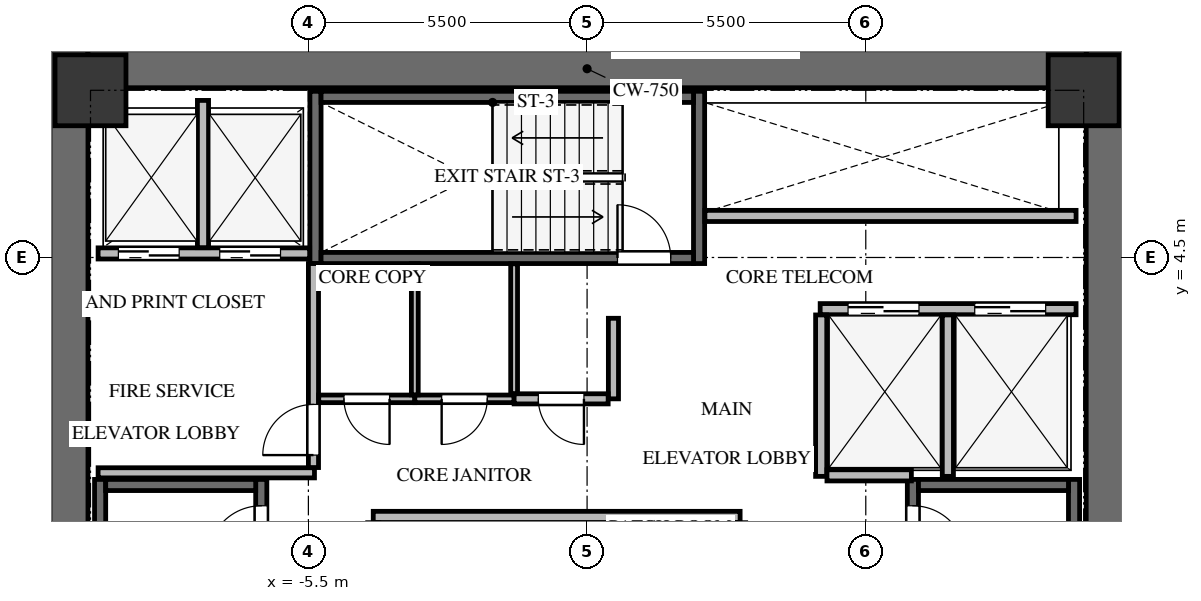
"""IFC4 building model, lengths in metres.
Left out: names, types, materials, properties, quantities, classifications, styles, units other than length and angle.
Written with IfcOpenShell. Run it as: python <this file> out.ifc"""

import sys

from ifc_helpers import new_model, si_unit, direction, frame, frame_2d, origin, origin_2d, place, context, subcontext, project, spatial, rectangle, extrude, source, transform, mapped, element, fill, save


model = new_model("IFC4")
c1 = context("Model", 3, precision=1e-05, world=origin(), true_north=direction((0.0, 1.0)))
c2 = subcontext(c1, "Body", "Model", "MODEL_VIEW")
j1 = project(units=[si_unit("LENGTHUNIT", "METRE"), si_unit("PLANEANGLEUNIT", "RADIAN")], contexts=[c1])
p1 = place(None, origin())
s1 = spatial("IfcSite", under=j1, at=p1, CompositionType="ELEMENT")
p2 = place(p1, origin())
s2 = spatial("IfcBuilding", under=s1, at=p2, CompositionType="ELEMENT")
p3 = place(p2, frame((0.0, 0.0, 120.6)))
s3 = spatial("IfcBuildingStorey", under=s2, at=p3, CompositionType="ELEMENT", Elevation=120.6)
for number, where, z_axis, x_axis in (
    (1, (-10.225, -8.6, 0.0), (0.0, 0.0, 1.0), (0.0, 1.0, 0.0)),
    (2, (10.225, -8.6, 0.0), (0.0, 0.0, 1.0), (0.0, 1.0, 0.0)),
):
    element("IfcWall", number, at=place(p3, frame(where, z_axis=z_axis, x_axis=x_axis)), inside=s3, PredefinedType="SHEAR", context=c2, shape_type="SweptSolid", body=[
        extrude(rectangle(XDim=17.2, YDim=0.75, at=frame_2d((8.6, 0.0))), origin(), (0.0, 0.0, 1.0), 3.3),
    ])
p4 = place(p3, frame((-9.85, 8.225, 0.0), z_axis=(0.0, 0.0, 1.0), x_axis=(1.0, 0.0, 0.0)))
e3 = element("IfcWall", 3, at=p4, inside=s3, PredefinedType="SHEAR", context=c2, shape_type="SweptSolid", body=[
    extrude(rectangle(XDim=19.7, YDim=0.75, at=frame_2d((9.85, 0.0))), origin(), (0.0, 0.0, 1.0), 3.3),
])
p5 = place(p3, frame((-6.43, -7.77, -0.24), z_axis=(0.0, 0.0, 1.0), x_axis=(0.0, 1.0, 0.0)))
e4 = element("IfcWall", 4, at=p5, inside=s3, PredefinedType="SHEAR", context=c2, shape_type="SweptSolid", body=[
    extrude(rectangle(XDim=7.89, YDim=0.22, at=frame_2d((3.945, 0.0))), origin(), (0.0, 0.0, 1.0), 3.3),
])
p6 = place(p5, frame((6.32, 0.0, 0.0)))
e5 = element("IfcOpeningElement", 5, at=p6, cuts=e4, PredefinedType="OPENING", context=c2, shape_type="SweptSolid", body=[
    extrude(rectangle(XDim=1.05, YDim=2.15, at=frame_2d((0.525, 1.075))), frame((0.0, 0.12, 0.0), z_axis=(0.0, -1.0, 0.0), x_axis=(1.0, 0.0, 0.0)), (0.0, 0.0, 1.0), 0.24),
])
p7 = place(p3, frame((-9.61, 0.12, -0.24), z_axis=(0.0, 0.0, 1.0), x_axis=(0.0, -1.0, 0.0)))
e6 = element("IfcWall", 6, at=p7, inside=s3, PredefinedType="SHEAR", context=c2, shape_type="SweptSolid", body=[
    extrude(rectangle(XDim=7.89, YDim=0.22, at=frame_2d((3.945, 0.0))), origin(), (0.0, 0.0, 1.0), 3.3),
])
p8 = place(p3, frame((-6.54, 0.01, -0.24), z_axis=(0.0, 0.0, 1.0), x_axis=(-1.0, 0.0, 0.0)))
e7 = element("IfcWall", 7, at=p8, inside=s3, PredefinedType="SHEAR", context=c2, shape_type="SweptSolid", body=[
    extrude(rectangle(XDim=2.96, YDim=0.22, at=frame_2d((1.48, 0.0))), origin(), (0.0, 0.0, 1.0), 3.3),
])
p9 = place(p3, frame((9.61, -7.77, -0.24), z_axis=(0.0, 0.0, 1.0), x_axis=(0.0, 1.0, 0.0)))
e8 = element("IfcWall", 8, at=p9, inside=s3, PredefinedType="SHEAR", context=c2, shape_type="SweptSolid", body=[
    extrude(rectangle(XDim=7.89, YDim=0.22, at=frame_2d((3.945, 0.0))), origin(), (0.0, 0.0, 1.0), 3.3),
])
p10 = place(p3, frame((6.43, 0.12, -0.24), z_axis=(0.0, 0.0, 1.0), x_axis=(0.0, -1.0, 0.0)))
e9 = element("IfcWall", 9, at=p10, inside=s3, PredefinedType="SHEAR", context=c2, shape_type="SweptSolid", body=[
    extrude(rectangle(XDim=7.89, YDim=0.22, at=frame_2d((3.945, 0.0))), origin(), (0.0, 0.0, 1.0), 3.3),
])
p11 = place(p10, frame((0.52, 0.0, 0.0)))
e10 = element("IfcOpeningElement", 10, at=p11, cuts=e9, PredefinedType="OPENING", context=c2, shape_type="SweptSolid", body=[
    extrude(rectangle(XDim=1.05, YDim=2.15, at=frame_2d((0.525, 1.075))), frame((0.0, 0.12, 0.0), z_axis=(0.0, -1.0, 0.0), x_axis=(1.0, 0.0, 0.0)), (0.0, 0.0, 1.0), 0.24),
])
p12 = place(p3, frame((9.5, 0.01, -0.24), z_axis=(0.0, 0.0, 1.0), x_axis=(-1.0, 0.0, 0.0)))
e11 = element("IfcWall", 11, at=p12, inside=s3, PredefinedType="SHEAR", context=c2, shape_type="SweptSolid", body=[
    extrude(rectangle(XDim=2.96, YDim=0.22, at=frame_2d((1.48, 0.0))), origin(), (0.0, 0.0, 1.0), 3.3),
])
for number, where, z_axis, x_axis in (
    (12, (2.21, 4.38, -0.24), (0.0, 0.0, 1.0), (0.0, 1.0, 0.0)),
    (13, (-5.36, 7.78, -0.24), (0.0, 0.0, 1.0), (0.0, -1.0, 0.0)),
):
    element("IfcWall", number, at=place(p3, frame(where, z_axis=z_axis, x_axis=x_axis)), inside=s3, PredefinedType="SHEAR", context=c2, shape_type="SweptSolid", body=[
        extrude(rectangle(XDim=3.4, YDim=0.22, at=frame_2d((1.7, 0.0))), origin(), (0.0, 0.0, 1.0), 3.3),
    ])
p13 = place(p3, frame((-5.25, 4.49, -0.24), z_axis=(0.0, 0.0, 1.0), x_axis=(1.0, 0.0, 0.0)))
e14 = element("IfcWall", 14, at=p13, inside=s3, PredefinedType="SHEAR", context=c2, shape_type="SweptSolid", body=[
    extrude(rectangle(XDim=7.35, YDim=0.22, at=frame_2d((3.675, 0.0))), origin(), (0.0, 0.0, 1.0), 3.3),
])
p14 = place(p13, frame((5.85, 0.0, 0.0)))
e15 = element("IfcOpeningElement", 15, at=p14, cuts=e14, PredefinedType="OPENING", context=c2, shape_type="SweptSolid", body=[
    extrude(rectangle(XDim=1.05, YDim=2.15, at=frame_2d((0.525, 1.075))), frame((0.0, 0.12, 0.0), z_axis=(0.0, -1.0, 0.0), x_axis=(1.0, 0.0, 0.0)), (0.0, 0.0, 1.0), 0.24),
])
p15 = place(p3, frame((2.1, 7.67, -0.24), z_axis=(0.0, 0.0, 1.0), x_axis=(-1.0, 0.0, 0.0)))
e16 = element("IfcWall", 16, at=p15, inside=s3, PredefinedType="SHEAR", context=c2, shape_type="SweptSolid", body=[
    extrude(rectangle(XDim=7.35, YDim=0.22, at=frame_2d((3.675, 0.0))), origin(), (0.0, 0.0, 1.0), 3.3),
])
m1 = source(origin(), c2, "Body", "SweptSolid", [
    extrude(rectangle(XDim=1.4, YDim=1.4, at=origin_2d()), origin(), (0.0, 0.0, 1.0), 3.3),
])
for number, where, z_axis, x_axis in (
    (17, (9.8, 7.8, -0.24), (0.0, 0.0, 1.0), (1.0, 0.0, 0.0)),
    (18, (-9.8, 7.8, -0.24), (0.0, 0.0, 1.0), (1.0, 0.0, 0.0)),
):
    element("IfcColumn", number, at=place(p3, frame(where, z_axis=z_axis, x_axis=x_axis)), inside=s3, PredefinedType="COLUMN", context=c2, shape_type="MappedRepresentation", body=[
        mapped(m1, transform((0.0, 0.0, 0.0), x_axis=(1.0, 0.0, 0.0), y_axis=(0.0, 1.0, 0.0), z_axis=(0.0, 0.0, 1.0), scale=1.0)),
    ])
p16 = place(p3, frame((-9.65, 4.58, 0.0), z_axis=(0.0, 0.0, 1.0), x_axis=(1.0, 0.0, 0.0)))
e19 = element("IfcWall", 19, at=p16, inside=s3, PredefinedType="SOLIDWALL", context=c2, shape_type="SweptSolid", body=[
    extrude(rectangle(XDim=4.175, YDim=0.22, at=frame_2d((2.087, 0.0))), origin(), (0.0, 0.0, 1.0), 3.045),
])
p17 = place(p16, frame((0.4, 0.0, 0.0)))
e20 = element("IfcOpeningElement", 20, at=p17, cuts=e19, PredefinedType="OPENING", context=c2, shape_type="SweptSolid", body=[
    extrude(rectangle(XDim=1.2, YDim=2.15, at=frame_2d((0.6, 1.075))), frame((0.0, 0.12, 0.0), z_axis=(0.0, -1.0, 0.0), x_axis=(1.0, 0.0, 0.0)), (0.0, 0.0, 1.0), 0.24),
])
p18 = place(p16, frame((2.4, 0.0, 0.0)))
e21 = element("IfcOpeningElement", 21, at=p18, cuts=e19, PredefinedType="OPENING", context=c2, shape_type="SweptSolid", body=[
    extrude(rectangle(XDim=1.2, YDim=2.15, at=frame_2d((0.6, 1.075))), frame((0.0, 0.12, 0.0), z_axis=(0.0, -1.0, 0.0), x_axis=(1.0, 0.0, 0.0)), (0.0, 0.0, 1.0), 0.24),
])
p19 = place(p3, frame((-7.58, 4.694, 0.0), z_axis=(0.0, 0.0, 1.0), x_axis=(0.0, 1.0, 0.0)))
e22 = element("IfcWall", 22, at=p19, inside=s3, PredefinedType="SOLIDWALL", context=c2, shape_type="SweptSolid", body=[
    extrude(rectangle(XDim=2.906, YDim=0.22, at=frame_2d((1.453, 0.0))), origin(), (0.0, 0.0, 1.0), 3.045),
])
p20 = place(p3, frame((-9.65, 0.25, 0.0), z_axis=(0.0, 0.0, 1.0), x_axis=(1.0, 0.0, 0.0)))
e23 = element("IfcWall", 23, at=p20, inside=s3, PredefinedType="SOLIDWALL", context=c2, shape_type="SweptSolid", body=[
    extrude(rectangle(XDim=4.27, YDim=0.2, at=frame_2d((2.135, 0.0))), origin(), (0.0, 0.0, 1.0), 3.045),
])
p21 = place(p3, frame((-5.4, 0.354, 0.0), z_axis=(0.0, 0.0, 1.0), x_axis=(0.0, 1.0, 0.0)))
e24 = element("IfcWall", 24, at=p21, inside=s3, PredefinedType="SOLIDWALL", context=c2, shape_type="SweptSolid", body=[
    extrude(rectangle(XDim=4.026, YDim=0.2, at=frame_2d((2.013, 0.0))), origin(), (0.0, 0.0, 1.0), 3.045),
])
p22 = place(p21, frame((0.246, 0.0, 0.0)))
e25 = element("IfcOpeningElement", 25, at=p22, cuts=e24, PredefinedType="OPENING", context=c2, shape_type="SweptSolid", body=[
    extrude(rectangle(XDim=1.0, YDim=2.15, at=frame_2d((0.5, 1.075))), frame((0.0, 0.11, 0.0), z_axis=(0.0, -1.0, 0.0), x_axis=(1.0, 0.0, 0.0)), (0.0, 0.0, 1.0), 0.22),
])
p23 = place(p3, frame((4.6, 3.48, 0.0), z_axis=(0.0, 0.0, 1.0), x_axis=(1.0, 0.0, 0.0)))
e26 = element("IfcWall", 26, at=p23, inside=s3, PredefinedType="SOLIDWALL", context=c2, shape_type="SweptSolid", body=[
    extrude(rectangle(XDim=5.05, YDim=0.22, at=frame_2d((2.525, 0.0))), origin(), (0.0, 0.0, 1.0), 3.045),
])
p24 = place(p23, frame((0.55, 0.0, 0.0)))
e27 = element("IfcOpeningElement", 27, at=p24, cuts=e26, PredefinedType="OPENING", context=c2, shape_type="SweptSolid", body=[
    extrude(rectangle(XDim=1.4, YDim=2.15, at=frame_2d((0.7, 1.075))), frame((0.0, 0.12, 0.0), z_axis=(0.0, -1.0, 0.0), x_axis=(1.0, 0.0, 0.0)), (0.0, 0.0, 1.0), 0.24),
])
p25 = place(p23, frame((3.05, 0.0, 0.0)))
e28 = element("IfcOpeningElement", 28, at=p25, cuts=e26, PredefinedType="OPENING", context=c2, shape_type="SweptSolid", body=[
    extrude(rectangle(XDim=1.4, YDim=2.15, at=frame_2d((0.7, 1.075))), frame((0.0, 0.12, 0.0), z_axis=(0.0, -1.0, 0.0), x_axis=(1.0, 0.0, 0.0)), (0.0, 0.0, 1.0), 0.24),
])
for number, where, z_axis, x_axis in (
    (29, (4.62, 0.18, 0.0), (0.0, 0.0, 1.0), (0.0, 1.0, 0.0)),
    (30, (7.12, 0.18, 0.0), (0.0, 0.0, 1.0), (0.0, 1.0, 0.0)),
):
    element("IfcWall", number, at=place(p3, frame(where, z_axis=z_axis, x_axis=x_axis)), inside=s3, PredefinedType="SOLIDWALL", context=c2, shape_type="SweptSolid", body=[
        extrude(rectangle(XDim=3.186, YDim=0.22, at=frame_2d((1.593, 0.0))), origin(), (0.0, 0.0, 1.0), 3.045),
    ])
p26 = place(p3, frame((4.734, 0.2, 0.0), z_axis=(0.0, 0.0, 1.0), x_axis=(1.0, 0.0, 0.0)))
e31 = element("IfcWall", 31, at=p26, inside=s3, PredefinedType="SOLIDWALL", context=c2, shape_type="SweptSolid", body=[
    extrude(rectangle(XDim=1.666, YDim=0.22, at=frame_2d((0.833, 0.0))), origin(), (0.0, 0.0, 1.0), 3.045),
])
p27 = place(p3, frame((-4.22, -0.62, 0.0), z_axis=(0.0, 0.0, 1.0), x_axis=(1.0, 0.0, 0.0)))
e32 = element("IfcWall", 32, at=p27, inside=s3, PredefinedType="SOLIDWALL", context=c2, shape_type="SweptSolid", body=[
    extrude(rectangle(XDim=7.24, YDim=0.22, at=frame_2d((3.62, 0.0))), origin(), (0.0, 0.0, 1.0), 3.045),
])
p28 = place(p3, frame((2.325, 5.32, 0.0), z_axis=(0.0, 0.0, 1.0), x_axis=(1.0, 0.0, 0.0)))
e33 = element("IfcWall", 33, at=p28, inside=s3, PredefinedType="SOLIDWALL", context=c2, shape_type="SweptSolid", body=[
    extrude(rectangle(XDim=7.325, YDim=0.22, at=frame_2d((3.663, 0.0))), origin(), (0.0, 0.0, 1.0), 3.045),
])
p29 = place(p3, frame((-3.4, 1.71, 0.0), z_axis=(0.0, 0.0, 1.0), x_axis=(-1.0, 0.0, 0.0)))
e34 = element("IfcWall", 34, at=p29, inside=s3, PredefinedType="PARTITIONING", context=c2, shape_type="SweptSolid", body=[
    extrude(rectangle(XDim=1.896, YDim=0.15, at=frame_2d((0.948, 0.0))), origin(), (0.0, 0.0, 1.0), 3.045),
])
p30 = place(p29, frame((0.498, 0.0, 0.0)))
e35 = element("IfcOpeningElement", 35, at=p30, cuts=e34, PredefinedType="OPENING", context=c2, shape_type="SweptSolid", body=[
    extrude(rectangle(XDim=0.9, YDim=2.05, at=frame_2d((0.45, 1.025))), frame((0.0, 0.085, 0.0), z_axis=(0.0, -1.0, 0.0), x_axis=(1.0, 0.0, 0.0)), (0.0, 0.0, 1.0), 0.17),
])
p31 = place(p3, frame((-1.44, 1.71, 0.0), z_axis=(0.0, 0.0, 1.0), x_axis=(-1.0, 0.0, 0.0)))
e36 = element("IfcWall", 36, at=p31, inside=s3, PredefinedType="PARTITIONING", context=c2, shape_type="SweptSolid", body=[
    extrude(rectangle(XDim=1.96, YDim=0.15, at=frame_2d((0.98, 0.0))), origin(), (0.0, 0.0, 1.0), 3.045),
])
p32 = place(p31, frame((0.53, 0.0, 0.0)))
e37 = element("IfcOpeningElement", 37, at=p32, cuts=e36, PredefinedType="OPENING", context=c2, shape_type="SweptSolid", body=[
    extrude(rectangle(XDim=0.9, YDim=2.05, at=frame_2d((0.45, 1.025))), frame((0.0, 0.085, 0.0), z_axis=(0.0, -1.0, 0.0), x_axis=(1.0, 0.0, 0.0)), (0.0, 0.0, 1.0), 0.17),
])
p33 = place(p3, frame((0.52, 3.3, 0.0), z_axis=(0.0, 0.0, 1.0), x_axis=(0.0, -1.0, 0.0)))
e38 = element("IfcWall", 38, at=p33, inside=s3, PredefinedType="SOLIDWALL", context=c2, shape_type="SweptSolid", body=[
    extrude(rectangle(XDim=1.59, YDim=0.2, at=frame_2d((0.795, 0.0))), origin(), (0.0, 0.0, 1.0), 3.045),
])
p34 = place(p3, frame((0.416, 1.71, 0.0), z_axis=(0.0, 0.0, 1.0), x_axis=(-1.0, 0.0, 0.0)))
e39 = element("IfcWall", 39, at=p34, inside=s3, PredefinedType="SOLIDWALL", context=c2, shape_type="SweptSolid", body=[
    extrude(rectangle(XDim=1.856, YDim=0.2, at=frame_2d((0.928, 0.0))), origin(), (0.0, 0.0, 1.0), 3.045),
])
p35 = place(p34, frame((0.478, 0.0, 0.0)))
e40 = element("IfcOpeningElement", 40, at=p35, cuts=e39, PredefinedType="OPENING", context=c2, shape_type="SweptSolid", body=[
    extrude(rectangle(XDim=0.9, YDim=2.05, at=frame_2d((0.45, 1.025))), frame((0.0, 0.11, 0.0), z_axis=(0.0, -1.0, 0.0), x_axis=(1.0, 0.0, 0.0)), (0.0, 0.0, 1.0), 0.22),
])
p36 = place(p3, frame((-3.4, 4.375, 0.0), z_axis=(0.0, 0.0, 1.0), x_axis=(0.0, -1.0, 0.0)))
e41 = element("IfcWall", 41, at=p36, inside=s3, PredefinedType="PARTITIONING", context=c2, shape_type="SweptSolid", body=[
    extrude(rectangle(XDim=2.586, YDim=0.135, at=frame_2d((1.293, 0.0))), origin(), (0.0, 0.0, 1.0), 3.045),
])
p37 = place(p3, frame((-1.44, 4.375, 0.0), z_axis=(0.0, 0.0, 1.0), x_axis=(0.0, -1.0, 0.0)))
e42 = element("IfcWall", 42, at=p37, inside=s3, PredefinedType="PARTITIONING", context=c2, shape_type="SweptSolid", body=[
    extrude(rectangle(XDim=2.561, YDim=0.135, at=frame_2d((1.281, 0.0))), origin(), (0.0, 0.0, 1.0), 3.045),
])
m2 = source(origin(), c2, "Body", "SweptSolid", [
    extrude(rectangle(XDim=1.05, YDim=2.15, at=frame_2d((0.525, 1.075))), frame((0.0, 0.025, 0.0), z_axis=(0.0, -1.0, 0.0), x_axis=(1.0, 0.0, 0.0)), (0.0, 0.0, 1.0), 0.05),
])
p38 = place(p6, origin())
e43 = element("IfcDoor", 43, at=p38, inside=s3, OperationType="SINGLE_SWING_LEFT", PredefinedType="DOOR", context=c2, shape_type="MappedRepresentation", body=[
    mapped(m2, transform((0.0, 0.0, 0.0), x_axis=(1.0, 0.0, 0.0), y_axis=(0.0, 1.0, 0.0), z_axis=(0.0, 0.0, 1.0), scale=1.0)),
])
fill(e5, e43)
m3 = source(origin(), c2, "Body", "SweptSolid", [
    extrude(rectangle(XDim=1.05, YDim=2.15, at=frame_2d((0.525, 1.075))), frame((0.0, 0.025, 0.0), z_axis=(0.0, -1.0, 0.0), x_axis=(1.0, 0.0, 0.0)), (0.0, 0.0, 1.0), 0.05),
])
p39 = place(p11, origin())
e44 = element("IfcDoor", 44, at=p39, inside=s3, OperationType="SINGLE_SWING_RIGHT", PredefinedType="DOOR", context=c2, shape_type="MappedRepresentation", body=[
    mapped(m3, transform((0.0, 0.0, 0.0), x_axis=(1.0, 0.0, 0.0), y_axis=(0.0, 1.0, 0.0), z_axis=(0.0, 0.0, 1.0), scale=1.0)),
])
fill(e10, e44)
p40 = place(p14, origin())
e45 = element("IfcDoor", 45, at=p40, inside=s3, OperationType="SINGLE_SWING_LEFT", PredefinedType="DOOR", context=c2, shape_type="MappedRepresentation", body=[
    mapped(m2, transform((0.0, 0.0, 0.0), x_axis=(1.0, 0.0, 0.0), y_axis=(0.0, 1.0, 0.0), z_axis=(0.0, 0.0, 1.0), scale=1.0)),
])
fill(e15, e45)
m4 = source(origin(), c2, "Body", "SweptSolid", [
    extrude(rectangle(XDim=1.2, YDim=2.15, at=frame_2d((0.6, 1.075))), frame((0.0, 0.025, 0.0), z_axis=(0.0, -1.0, 0.0), x_axis=(1.0, 0.0, 0.0)), (0.0, 0.0, 1.0), 0.05),
])
p41 = place(p17, origin())
e46 = element("IfcDoor", 46, at=p41, inside=s3, OperationType="DOUBLE_DOOR_SLIDING", PredefinedType="DOOR", context=c2, shape_type="MappedRepresentation", body=[
    mapped(m4, transform((0.0, 0.0, 0.0), x_axis=(1.0, 0.0, 0.0), y_axis=(0.0, 1.0, 0.0), z_axis=(0.0, 0.0, 1.0), scale=1.0)),
])
fill(e20, e46)
p42 = place(p18, origin())
e47 = element("IfcDoor", 47, at=p42, inside=s3, OperationType="DOUBLE_DOOR_SLIDING", PredefinedType="DOOR", context=c2, shape_type="MappedRepresentation", body=[
    mapped(m4, transform((0.0, 0.0, 0.0), x_axis=(1.0, 0.0, 0.0), y_axis=(0.0, 1.0, 0.0), z_axis=(0.0, 0.0, 1.0), scale=1.0)),
])
fill(e21, e47)
m5 = source(origin(), c2, "Body", "SweptSolid", [
    extrude(rectangle(XDim=1.0, YDim=2.15, at=frame_2d((0.5, 1.075))), frame((0.0, 0.025, 0.0), z_axis=(0.0, -1.0, 0.0), x_axis=(1.0, 0.0, 0.0)), (0.0, 0.0, 1.0), 0.05),
])
p43 = place(p22, origin())
e48 = element("IfcDoor", 48, at=p43, inside=s3, OperationType="SINGLE_SWING_LEFT", PredefinedType="DOOR", context=c2, shape_type="MappedRepresentation", body=[
    mapped(m5, transform((0.0, 0.0, 0.0), x_axis=(1.0, 0.0, 0.0), y_axis=(0.0, 1.0, 0.0), z_axis=(0.0, 0.0, 1.0), scale=1.0)),
])
fill(e25, e48)
m6 = source(origin(), c2, "Body", "SweptSolid", [
    extrude(rectangle(XDim=1.4, YDim=2.15, at=frame_2d((0.7, 1.075))), frame((0.0, 0.025, 0.0), z_axis=(0.0, -1.0, 0.0), x_axis=(1.0, 0.0, 0.0)), (0.0, 0.0, 1.0), 0.05),
])
p44 = place(p24, origin())
e49 = element("IfcDoor", 49, at=p44, inside=s3, OperationType="DOUBLE_DOOR_SLIDING", PredefinedType="DOOR", context=c2, shape_type="MappedRepresentation", body=[
    mapped(m6, transform((0.0, 0.0, 0.0), x_axis=(1.0, 0.0, 0.0), y_axis=(0.0, 1.0, 0.0), z_axis=(0.0, 0.0, 1.0), scale=1.0)),
])
fill(e27, e49)
p45 = place(p25, origin())
e50 = element("IfcDoor", 50, at=p45, inside=s3, OperationType="DOUBLE_DOOR_SLIDING", PredefinedType="DOOR", context=c2, shape_type="MappedRepresentation", body=[
    mapped(m6, transform((0.0, 0.0, 0.0), x_axis=(1.0, 0.0, 0.0), y_axis=(0.0, 1.0, 0.0), z_axis=(0.0, 0.0, 1.0), scale=1.0)),
])
fill(e28, e50)
m7 = source(origin(), c2, "Body", "SweptSolid", [
    extrude(rectangle(XDim=0.9, YDim=2.05, at=frame_2d((0.45, 1.025))), frame((0.0, 0.025, 0.0), z_axis=(0.0, -1.0, 0.0), x_axis=(1.0, 0.0, 0.0)), (0.0, 0.0, 1.0), 0.05),
])
p46 = place(p30, origin())
e51 = element("IfcDoor", 51, at=p46, inside=s3, OperationType="SINGLE_SWING_LEFT", PredefinedType="DOOR", context=c2, shape_type="MappedRepresentation", body=[
    mapped(m7, transform((0.0, 0.0, 0.0), x_axis=(1.0, 0.0, 0.0), y_axis=(0.0, 1.0, 0.0), z_axis=(0.0, 0.0, 1.0), scale=1.0)),
])
fill(e35, e51)
m8 = source(origin(), c2, "Body", "SweptSolid", [
    extrude(rectangle(XDim=0.9, YDim=2.05, at=frame_2d((0.45, 1.025))), frame((0.0, 0.025, 0.0), z_axis=(0.0, -1.0, 0.0), x_axis=(1.0, 0.0, 0.0)), (0.0, 0.0, 1.0), 0.05),
])
p47 = place(p32, origin())
e52 = element("IfcDoor", 52, at=p47, inside=s3, OperationType="SINGLE_SWING_RIGHT", PredefinedType="DOOR", context=c2, shape_type="MappedRepresentation", body=[
    mapped(m8, transform((0.0, 0.0, 0.0), x_axis=(1.0, 0.0, 0.0), y_axis=(0.0, 1.0, 0.0), z_axis=(0.0, 0.0, 1.0), scale=1.0)),
])
fill(e37, e52)
p48 = place(p35, origin())
e53 = element("IfcDoor", 53, at=p48, inside=s3, OperationType="SINGLE_SWING_LEFT", PredefinedType="DOOR", context=c2, shape_type="MappedRepresentation", body=[
    mapped(m7, transform((0.0, 0.0, 0.0), x_axis=(1.0, 0.0, 0.0), y_axis=(0.0, 1.0, 0.0), z_axis=(0.0, 0.0, 1.0), scale=1.0)),
])
fill(e40, e53)
save(model, sys.argv[1])
